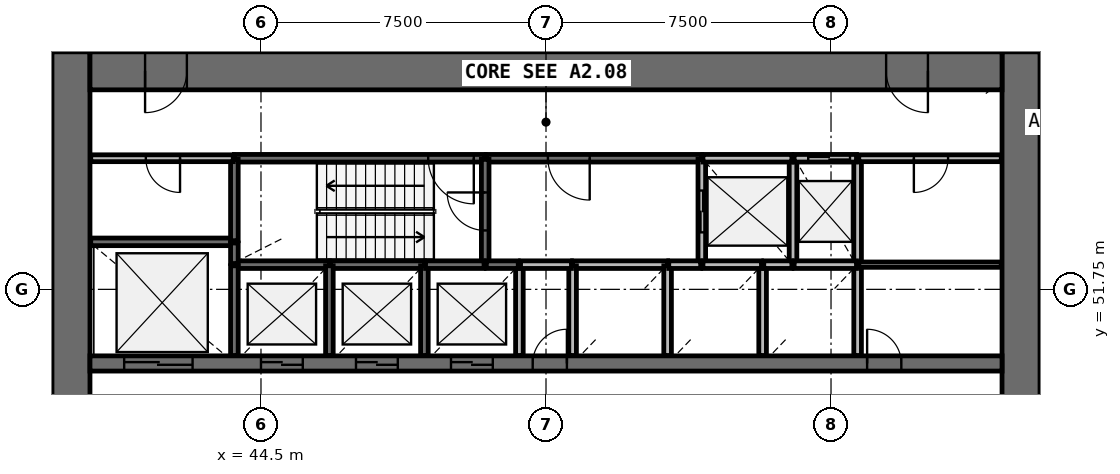
"""IFC4 building model, lengths in metres.
Left out: names, types, materials, properties, quantities, classifications, styles, units other than length and angle.
Written with IfcOpenShell. Run it as: python <this file> out.ifc"""

import sys

from ifc_helpers import new_model, si_unit, direction, frame, frame_2d, origin, place, context, subcontext, project, spatial, rectangle, extrude, source, transform, mapped, element, fill, save


model = new_model("IFC4")
c1 = context("Model", 3, precision=1e-05, world=origin(), true_north=direction((0.0, 1.0)))
c2 = subcontext(c1, "Body", "Model", "MODEL_VIEW")
j1 = project(units=[si_unit("LENGTHUNIT", "METRE"), si_unit("PLANEANGLEUNIT", "RADIAN")], contexts=[c1])
p1 = place(None, origin())
s1 = spatial("IfcSite", under=j1, at=p1, CompositionType="ELEMENT")
p2 = place(p1, origin())
s2 = spatial("IfcBuilding", under=s1, at=p2, CompositionType="ELEMENT")
p3 = place(p2, frame((0.0, 0.0, 31.4)))
s3 = spatial("IfcBuildingStorey", under=s2, at=p3, CompositionType="ELEMENT", Elevation=31.4)
p4 = place(p3, frame((64.5, 38.0, 0.0), z_axis=(0.0, 0.0, 1.0), x_axis=(0.0, 1.0, 0.0)))
e1 = element("IfcWall", 1, at=p4, inside=s3, PredefinedType="SHEAR", context=c2, shape_type="SweptSolid", body=[
    extrude(rectangle(XDim=20.0, YDim=1.0, at=frame_2d((10.0, 0.0))), origin(), (0.0, 0.0, 1.0), 4.4),
])
p5 = place(p4, frame((9.1, 0.0, 0.0)))
e2 = element("IfcOpeningElement", 2, at=p5, cuts=e1, PredefinedType="OPENING", context=c2, shape_type="SweptSolid", body=[
    extrude(rectangle(XDim=1.8, YDim=2.1, at=frame_2d((0.9, 1.05))), frame((0.0, 0.51, 0.0), z_axis=(0.0, -1.0, 0.0), x_axis=(1.0, 0.0, 0.0)), (0.0, 0.0, 1.0), 1.02),
])
p6 = place(p3, frame((39.5, 58.0, 0.0), z_axis=(0.0, 0.0, 1.0), x_axis=(0.0, -1.0, 0.0)))
e3 = element("IfcWall", 3, at=p6, inside=s3, PredefinedType="SHEAR", context=c2, shape_type="SweptSolid", body=[
    extrude(rectangle(XDim=20.0, YDim=1.0, at=frame_2d((10.0, 0.0))), origin(), (0.0, 0.0, 1.0), 4.4),
])
p7 = place(p6, frame((9.1, 0.0, 0.0)))
e4 = element("IfcOpeningElement", 4, at=p7, cuts=e3, PredefinedType="OPENING", context=c2, shape_type="SweptSolid", body=[
    extrude(rectangle(XDim=1.8, YDim=2.1, at=frame_2d((0.9, 1.05))), frame((0.0, 0.51, 0.0), z_axis=(0.0, -1.0, 0.0), x_axis=(1.0, 0.0, 0.0)), (0.0, 0.0, 1.0), 1.02),
])
p8 = place(p3, frame((64.0, 57.5, 0.0), z_axis=(0.0, 0.0, 1.0), x_axis=(-1.0, 0.0, 0.0)))
e5 = element("IfcWall", 5, at=p8, inside=s3, PredefinedType="SHEAR", context=c2, shape_type="SweptSolid", body=[
    extrude(rectangle(XDim=24.0, YDim=1.0, at=frame_2d((12.0, 0.0))), origin(), (0.0, 0.0, 1.0), 4.4),
])
p9 = place(p8, frame((21.45, 0.0, 0.0)))
e6 = element("IfcOpeningElement", 6, at=p9, cuts=e5, PredefinedType="OPENING", context=c2, shape_type="SweptSolid", body=[
    extrude(rectangle(XDim=1.1, YDim=2.1, at=frame_2d((0.55, 1.05))), frame((0.0, 0.51, 0.0), z_axis=(0.0, -1.0, 0.0), x_axis=(1.0, 0.0, 0.0)), (0.0, 0.0, 1.0), 1.02),
])
p10 = place(p8, frame((1.95, 0.0, 0.0)))
e7 = element("IfcOpeningElement", 7, at=p10, cuts=e5, PredefinedType="OPENING", context=c2, shape_type="SweptSolid", body=[
    extrude(rectangle(XDim=1.1, YDim=2.1, at=frame_2d((0.55, 1.05))), frame((0.0, 0.51, 0.0), z_axis=(0.0, -1.0, 0.0), x_axis=(1.0, 0.0, 0.0)), (0.0, 0.0, 1.0), 1.02),
])
p11 = place(p3, frame((40.0, 49.8, 0.0), z_axis=(0.0, 0.0, 1.0), x_axis=(1.0, 0.0, 0.0)))
e8 = element("IfcWall", 8, at=p11, inside=s3, PredefinedType="SHEAR", context=c2, shape_type="SweptSolid", body=[
    extrude(rectangle(XDim=24.0, YDim=0.4, at=frame_2d((12.0, 0.0))), origin(), (0.0, 0.0, 1.0), 4.4),
])
p12 = place(p11, frame((4.5, 0.0, 0.0)))
e9 = element("IfcOpeningElement", 9, at=p12, cuts=e8, PredefinedType="OPENING", context=c2, shape_type="SweptSolid", body=[
    extrude(rectangle(XDim=1.1, YDim=2.1, at=frame_2d((0.55, 1.05))), frame((0.0, 0.21, 0.0), z_axis=(0.0, -1.0, 0.0), x_axis=(1.0, 0.0, 0.0)), (0.0, 0.0, 1.0), 0.42),
])
p13 = place(p11, frame((7.0, 0.0, 0.0)))
e10 = element("IfcOpeningElement", 10, at=p13, cuts=e8, PredefinedType="OPENING", context=c2, shape_type="SweptSolid", body=[
    extrude(rectangle(XDim=1.1, YDim=2.1, at=frame_2d((0.55, 1.05))), frame((0.0, 0.21, 0.0), z_axis=(0.0, -1.0, 0.0), x_axis=(1.0, 0.0, 0.0)), (0.0, 0.0, 1.0), 0.42),
])
p14 = place(p11, frame((9.5, 0.0, 0.0)))
e11 = element("IfcOpeningElement", 11, at=p14, cuts=e8, PredefinedType="OPENING", context=c2, shape_type="SweptSolid", body=[
    extrude(rectangle(XDim=1.1, YDim=2.1, at=frame_2d((0.55, 1.05))), frame((0.0, 0.21, 0.0), z_axis=(0.0, -1.0, 0.0), x_axis=(1.0, 0.0, 0.0)), (0.0, 0.0, 1.0), 0.42),
])
p15 = place(p11, frame((0.9, 0.0, 0.0)))
e12 = element("IfcOpeningElement", 12, at=p15, cuts=e8, PredefinedType="OPENING", context=c2, shape_type="SweptSolid", body=[
    extrude(rectangle(XDim=1.8, YDim=2.4, at=frame_2d((0.9, 1.2))), frame((0.0, 0.21, 0.0), z_axis=(0.0, -1.0, 0.0), x_axis=(1.0, 0.0, 0.0)), (0.0, 0.0, 1.0), 0.42),
])
p16 = place(p11, frame((20.45, 0.0, 0.0)))
e13 = element("IfcOpeningElement", 13, at=p16, cuts=e8, PredefinedType="OPENING", context=c2, shape_type="SweptSolid", body=[
    extrude(rectangle(XDim=0.9, YDim=2.1, at=frame_2d((0.45, 1.05))), frame((0.0, 0.21, 0.0), z_axis=(0.0, -1.0, 0.0), x_axis=(1.0, 0.0, 0.0)), (0.0, 0.0, 1.0), 0.42),
])
p17 = place(p11, frame((11.65, 0.0, 0.0)))
e14 = element("IfcOpeningElement", 14, at=p17, cuts=e8, PredefinedType="OPENING", context=c2, shape_type="SweptSolid", body=[
    extrude(rectangle(XDim=0.9, YDim=2.1, at=frame_2d((0.45, 1.05))), frame((0.0, 0.21, 0.0), z_axis=(0.0, -1.0, 0.0), x_axis=(1.0, 0.0, 0.0)), (0.0, 0.0, 1.0), 0.42),
])
p18 = place(p3, frame((50.4, 55.2, 0.0), z_axis=(0.0, 0.0, 1.0), x_axis=(-1.0, 0.0, 0.0)))
e15 = element("IfcWall", 15, at=p18, inside=s3, PredefinedType="SOLIDWALL", context=c2, shape_type="SweptSolid", body=[
    extrude(rectangle(XDim=6.6, YDim=0.2, at=frame_2d((3.3, 0.0))), origin(), (0.0, 0.0, 1.0), 3.95),
])
p19 = place(p18, frame((0.3, 0.0, 0.0)))
e16 = element("IfcOpeningElement", 16, at=p19, cuts=e15, PredefinedType="OPENING", context=c2, shape_type="SweptSolid", body=[
    extrude(rectangle(XDim=1.2, YDim=2.1, at=frame_2d((0.6, 1.05))), frame((0.0, 0.11, 0.0), z_axis=(0.0, -1.0, 0.0), x_axis=(1.0, 0.0, 0.0)), (0.0, 0.0, 1.0), 0.22),
])
p20 = place(p3, frame((56.1, 55.2, 0.0), z_axis=(0.0, 0.0, 1.0), x_axis=(-1.0, 0.0, 0.0)))
e17 = element("IfcWall", 17, at=p20, inside=s3, PredefinedType="SOLIDWALL", context=c2, shape_type="SweptSolid", body=[
    extrude(rectangle(XDim=5.67, YDim=0.2, at=frame_2d((2.835, 0.0))), origin(), (0.0, 0.0, 1.0), 3.95),
])
p21 = place(p20, frame((2.95, 0.0, 0.0)))
e18 = element("IfcOpeningElement", 18, at=p21, cuts=e17, PredefinedType="OPENING", context=c2, shape_type="SweptSolid", body=[
    extrude(rectangle(XDim=1.1, YDim=2.1, at=frame_2d((0.55, 1.05))), frame((0.0, 0.11, 0.0), z_axis=(0.0, -1.0, 0.0), x_axis=(1.0, 0.0, 0.0)), (0.0, 0.0, 1.0), 0.22),
])
p22 = place(p3, frame((43.8, 53.0, 0.0), z_axis=(0.0, 0.0, 1.0), x_axis=(-1.0, 0.0, 0.0)))
e19 = element("IfcWall", 19, at=p22, inside=s3, PredefinedType="SOLIDWALL", context=c2, shape_type="SweptSolid", body=[
    extrude(rectangle(XDim=3.78, YDim=0.2, at=frame_2d((1.89, 0.0))), origin(), (0.0, 0.0, 1.0), 3.95),
])
p23 = place(p3, frame((50.4, 52.4, 0.0), z_axis=(0.0, 0.0, 1.0), x_axis=(0.0, 1.0, 0.0)))
e20 = element("IfcWall", 20, at=p23, inside=s3, PredefinedType="SOLIDWALL", context=c2, shape_type="SweptSolid", body=[
    extrude(rectangle(XDim=2.77, YDim=0.2, at=frame_2d((1.385, 0.0))), origin(), (0.0, 0.0, 1.0), 3.95),
])
p24 = place(p23, frame((0.9, 0.0, 0.0)))
e21 = element("IfcOpeningElement", 21, at=p24, cuts=e20, PredefinedType="OPENING", context=c2, shape_type="SweptSolid", body=[
    extrude(rectangle(XDim=1.0, YDim=2.1, at=frame_2d((0.5, 1.05))), frame((0.0, 0.11, 0.0), z_axis=(0.0, -1.0, 0.0), x_axis=(1.0, 0.0, 0.0)), (0.0, 0.0, 1.0), 0.22),
])
p25 = place(p3, frame((56.1, 55.17, 0.0), z_axis=(0.0, 0.0, 1.0), x_axis=(0.0, -1.0, 0.0)))
e22 = element("IfcWall", 22, at=p25, inside=s3, PredefinedType="SOLIDWALL", context=c2, shape_type="SweptSolid", body=[
    extrude(rectangle(XDim=2.77, YDim=0.2, at=frame_2d((1.385, 0.0))), origin(), (0.0, 0.0, 1.0), 3.95),
])
p26 = place(p25, frame((0.82, 0.0, 0.0)))
e23 = element("IfcOpeningElement", 23, at=p26, cuts=e22, PredefinedType="OPENING", context=c2, shape_type="SweptSolid", body=[
    extrude(rectangle(XDim=1.1, YDim=2.1, at=frame_2d((0.55, 1.05))), frame((0.0, 0.11, 0.0), z_axis=(0.0, -1.0, 0.0), x_axis=(1.0, 0.0, 0.0)), (0.0, 0.0, 1.0), 0.22),
])
for number, where, z_axis, x_axis in (
    (24, (58.5, 52.4, 0.0), (0.0, 0.0, 1.0), (0.0, 1.0, 0.0)),
    (25, (60.2, 52.4, 0.0), (0.0, 0.0, 1.0), (0.0, 1.0, 0.0)),
):
    element("IfcWall", number, at=place(p3, frame(where, z_axis=z_axis, x_axis=x_axis)), inside=s3, PredefinedType="SOLIDWALL", context=c2, shape_type="SweptSolid", body=[
        extrude(rectangle(XDim=2.8, YDim=0.2, at=frame_2d((1.4, 0.0))), origin(), (0.0, 0.0, 1.0), 3.95),
    ])
p27 = place(p3, frame((46.3, 52.4, 0.0), z_axis=(0.0, 0.0, 1.0), x_axis=(-1.0, 0.0, 0.0)))
e26 = element("IfcWall", 26, at=p27, inside=s3, PredefinedType="SOLIDWALL", context=c2, shape_type="SweptSolid", body=[
    extrude(rectangle(XDim=2.5, YDim=0.2, at=frame_2d((1.25, 0.0))), origin(), (0.0, 0.0, 1.0), 3.95),
])
p28 = place(p3, frame((48.8, 52.4, 0.0), z_axis=(0.0, 0.0, 1.0), x_axis=(-1.0, 0.0, 0.0)))
e27 = element("IfcWall", 27, at=p28, inside=s3, PredefinedType="SOLIDWALL", context=c2, shape_type="SweptSolid", body=[
    extrude(rectangle(XDim=2.47, YDim=0.2, at=frame_2d((1.235, 0.0))), origin(), (0.0, 0.0, 1.0), 3.95),
])
p29 = place(p3, frame((55.2, 52.4, 0.0), z_axis=(0.0, 0.0, 1.0), x_axis=(-1.0, 0.0, 0.0)))
e28 = element("IfcWall", 28, at=p29, inside=s3, PredefinedType="SOLIDWALL", context=c2, shape_type="SweptSolid", body=[
    extrude(rectangle(XDim=2.5, YDim=0.2, at=frame_2d((1.25, 0.0))), origin(), (0.0, 0.0, 1.0), 3.95),
])
p30 = place(p3, frame((58.47, 55.2, 0.0), z_axis=(0.0, 0.0, 1.0), x_axis=(-1.0, 0.0, 0.0)))
e29 = element("IfcWall", 29, at=p30, inside=s3, PredefinedType="SOLIDWALL", context=c2, shape_type="SweptSolid", body=[
    extrude(rectangle(XDim=2.34, YDim=0.2, at=frame_2d((1.17, 0.0))), origin(), (0.0, 0.0, 1.0), 3.95),
])
for number, where, z_axis, x_axis in (
    (30, (43.8, 52.37, 0.0), (0.0, 0.0, 1.0), (0.0, -1.0, 0.0)),
    (31, (46.3, 50.01, 0.0), (0.0, 0.0, 1.0), (0.0, 1.0, 0.0)),
    (32, (48.8, 50.01, 0.0), (0.0, 0.0, 1.0), (0.0, 1.0, 0.0)),
):
    element("IfcWall", number, at=place(p3, frame(where, z_axis=z_axis, x_axis=x_axis)), inside=s3, PredefinedType="SOLIDWALL", context=c2, shape_type="SweptSolid", body=[
        extrude(rectangle(XDim=2.36, YDim=0.2, at=frame_2d((1.18, 0.0))), origin(), (0.0, 0.0, 1.0), 3.95),
    ])
p31 = place(p3, frame((51.3, 50.01, 0.0), z_axis=(0.0, 0.0, 1.0), x_axis=(0.0, 1.0, 0.0)))
e33 = element("IfcWall", 33, at=p31, inside=s3, PredefinedType="SOLIDWALL", context=c2, shape_type="SweptSolid", body=[
    extrude(rectangle(XDim=2.39, YDim=0.2, at=frame_2d((1.195, 0.0))), origin(), (0.0, 0.0, 1.0), 3.95),
])
for number, where, z_axis, x_axis in (
    (34, (52.7, 52.37, 0.0), (0.0, 0.0, 1.0), (0.0, -1.0, 0.0)),
    (35, (55.2, 50.01, 0.0), (0.0, 0.0, 1.0), (0.0, 1.0, 0.0)),
):
    element("IfcWall", number, at=place(p3, frame(where, z_axis=z_axis, x_axis=x_axis)), inside=s3, PredefinedType="SOLIDWALL", context=c2, shape_type="SweptSolid", body=[
        extrude(rectangle(XDim=2.36, YDim=0.2, at=frame_2d((1.18, 0.0))), origin(), (0.0, 0.0, 1.0), 3.95),
    ])
p32 = place(p3, frame((57.7, 50.01, 0.0), z_axis=(0.0, 0.0, 1.0), x_axis=(0.0, 1.0, 0.0)))
e36 = element("IfcWall", 36, at=p32, inside=s3, PredefinedType="SOLIDWALL", context=c2, shape_type="SweptSolid", body=[
    extrude(rectangle(XDim=2.39, YDim=0.2, at=frame_2d((1.195, 0.0))), origin(), (0.0, 0.0, 1.0), 3.95),
])
p33 = place(p3, frame((60.2, 50.01, 0.0), z_axis=(0.0, 0.0, 1.0), x_axis=(0.0, 1.0, 0.0)))
e37 = element("IfcWall", 37, at=p33, inside=s3, PredefinedType="SOLIDWALL", context=c2, shape_type="SweptSolid", body=[
    extrude(rectangle(XDim=2.36, YDim=0.2, at=frame_2d((1.18, 0.0))), origin(), (0.0, 0.0, 1.0), 3.95),
])
p34 = place(p3, frame((43.8, 55.17, 0.0), z_axis=(0.0, 0.0, 1.0), x_axis=(0.0, -1.0, 0.0)))
e38 = element("IfcWall", 38, at=p34, inside=s3, PredefinedType="SOLIDWALL", context=c2, shape_type="SweptSolid", body=[
    extrude(rectangle(XDim=2.14, YDim=0.2, at=frame_2d((1.07, 0.0))), origin(), (0.0, 0.0, 1.0), 3.95),
])
p35 = place(p3, frame((60.17, 52.4, 0.0), z_axis=(0.0, 0.0, 1.0), x_axis=(-1.0, 0.0, 0.0)))
e39 = element("IfcWall", 39, at=p35, inside=s3, PredefinedType="SOLIDWALL", context=c2, shape_type="SweptSolid", body=[
    extrude(rectangle(XDim=1.64, YDim=0.2, at=frame_2d((0.82, 0.0))), origin(), (0.0, 0.0, 1.0), 3.95),
])
p36 = place(p3, frame((60.17, 55.2, 0.0), z_axis=(0.0, 0.0, 1.0), x_axis=(-1.0, 0.0, 0.0)))
e40 = element("IfcWall", 40, at=p36, inside=s3, PredefinedType="SOLIDWALL", context=c2, shape_type="SweptSolid", body=[
    extrude(rectangle(XDim=1.64, YDim=0.2, at=frame_2d((0.82, 0.0))), origin(), (0.0, 0.0, 1.0), 3.95),
])
p37 = place(p36, frame((0.17, 0.0, 0.0)))
e41 = element("IfcOpeningElement", 41, at=p37, cuts=e40, PredefinedType="OPENING", context=c2, shape_type="SweptSolid", body=[
    extrude(rectangle(XDim=1.1, YDim=2.1, at=frame_2d((0.55, 1.05))), frame((0.0, 0.11, 0.0), z_axis=(0.0, -1.0, 0.0), x_axis=(1.0, 0.0, 0.0)), (0.0, 0.0, 1.0), 0.22),
])
for number, where, z_axis, x_axis in (
    (42, (50.37, 52.4, 0.0), (0.0, 0.0, 1.0), (-1.0, 0.0, 0.0)),
    (43, (57.67, 52.4, 0.0), (0.0, 0.0, 1.0), (-1.0, 0.0, 0.0)),
):
    element("IfcWall", number, at=place(p3, frame(where, z_axis=z_axis, x_axis=x_axis)), inside=s3, PredefinedType="SOLIDWALL", context=c2, shape_type="SweptSolid", body=[
        extrude(rectangle(XDim=1.54, YDim=0.2, at=frame_2d((0.77, 0.0))), origin(), (0.0, 0.0, 1.0), 3.95),
    ])
p38 = place(p3, frame((51.33, 52.4, 0.0), z_axis=(0.0, 0.0, 1.0), x_axis=(1.0, 0.0, 0.0)))
e44 = element("IfcWall", 44, at=p38, inside=s3, PredefinedType="SOLIDWALL", context=c2, shape_type="SweptSolid", body=[
    extrude(rectangle(XDim=1.34, YDim=0.2, at=frame_2d((0.67, 0.0))), origin(), (0.0, 0.0, 1.0), 3.95),
])
for number, where, z_axis, x_axis in (
    (45, (51.27, 52.4, 0.0), (0.0, 0.0, 1.0), (-1.0, 0.0, 0.0)),
    (46, (56.07, 52.4, 0.0), (0.0, 0.0, 1.0), (-1.0, 0.0, 0.0)),
):
    element("IfcWall", number, at=place(p3, frame(where, z_axis=z_axis, x_axis=x_axis)), inside=s3, PredefinedType="SOLIDWALL", context=c2, shape_type="SweptSolid", body=[
        extrude(rectangle(XDim=0.84, YDim=0.2, at=frame_2d((0.42, 0.0))), origin(), (0.0, 0.0, 1.0), 3.95),
    ])
p39 = place(p3, frame((58.47, 52.4, 0.0), z_axis=(0.0, 0.0, 1.0), x_axis=(-1.0, 0.0, 0.0)))
e47 = element("IfcWall", 47, at=p39, inside=s3, PredefinedType="SOLIDWALL", context=c2, shape_type="SweptSolid", body=[
    extrude(rectangle(XDim=0.74, YDim=0.2, at=frame_2d((0.37, 0.0))), origin(), (0.0, 0.0, 1.0), 3.95),
])
p40 = place(p3, frame((43.8, 52.43, 0.0), z_axis=(0.0, 0.0, 1.0), x_axis=(0.0, 1.0, 0.0)))
e48 = element("IfcWall", 48, at=p40, inside=s3, PredefinedType="SOLIDWALL", context=c2, shape_type="SweptSolid", body=[
    extrude(rectangle(XDim=0.54, YDim=0.2, at=frame_2d((0.27, 0.0))), origin(), (0.0, 0.0, 1.0), 3.95),
])
p41 = place(p3, frame((43.77, 55.2, 0.0), z_axis=(0.0, 0.0, 1.0), x_axis=(-1.0, 0.0, 0.0)))
e49 = element("IfcWall", 49, at=p41, inside=s3, PredefinedType="PARTITIONING", context=c2, shape_type="SweptSolid", body=[
    extrude(rectangle(XDim=3.75, YDim=0.18, at=frame_2d((1.875, 0.0))), origin(), (0.0, 0.0, 1.0), 3.95),
])
p42 = place(p41, frame((1.4, 0.0, 0.0)))
e50 = element("IfcOpeningElement", 50, at=p42, cuts=e49, PredefinedType="OPENING", context=c2, shape_type="SweptSolid", body=[
    extrude(rectangle(XDim=0.9, YDim=2.1, at=frame_2d((0.45, 1.05))), frame((0.0, 0.1, 0.0), z_axis=(0.0, -1.0, 0.0), x_axis=(1.0, 0.0, 0.0)), (0.0, 0.0, 1.0), 0.2),
])
p43 = place(p3, frame((63.98, 55.2, 0.0), z_axis=(0.0, 0.0, 1.0), x_axis=(-1.0, 0.0, 0.0)))
e51 = element("IfcWall", 51, at=p43, inside=s3, PredefinedType="PARTITIONING", context=c2, shape_type="SweptSolid", body=[
    extrude(rectangle(XDim=3.75, YDim=0.18, at=frame_2d((1.875, 0.0))), origin(), (0.0, 0.0, 1.0), 3.95),
])
p44 = place(p43, frame((1.4, 0.0, 0.0)))
e52 = element("IfcOpeningElement", 52, at=p44, cuts=e51, PredefinedType="OPENING", context=c2, shape_type="SweptSolid", body=[
    extrude(rectangle(XDim=0.9, YDim=2.1, at=frame_2d((0.45, 1.05))), frame((0.0, 0.1, 0.0), z_axis=(0.0, -1.0, 0.0), x_axis=(1.0, 0.0, 0.0)), (0.0, 0.0, 1.0), 0.2),
])
p45 = place(p3, frame((63.98, 52.4, 0.0), z_axis=(0.0, 0.0, 1.0), x_axis=(-1.0, 0.0, 0.0)))
e53 = element("IfcWall", 53, at=p45, inside=s3, PredefinedType="PARTITIONING", context=c2, shape_type="SweptSolid", body=[
    extrude(rectangle(XDim=3.75, YDim=0.14, at=frame_2d((1.875, 0.0))), origin(), (0.0, 0.0, 1.0), 3.05),
])
m1 = source(origin(), c2, "Body", "SweptSolid", [
    extrude(rectangle(XDim=1.1, YDim=2.1, at=frame_2d((0.55, 1.05))), frame((0.0, 0.025, 0.0), z_axis=(0.0, -1.0, 0.0), x_axis=(1.0, 0.0, 0.0)), (0.0, 0.0, 1.0), 0.05),
])
p46 = place(p12, origin())
e54 = element("IfcDoor", 54, at=p46, inside=s3, OperationType="DOUBLE_DOOR_SLIDING", PredefinedType="USERDEFINED", context=c2, shape_type="MappedRepresentation", body=[
    mapped(m1, transform((0.0, 0.0, 0.0), scale=1.0)),
])
fill(e9, e54)
p47 = place(p13, origin())
e55 = element("IfcDoor", 55, at=p47, inside=s3, OperationType="DOUBLE_DOOR_SLIDING", PredefinedType="USERDEFINED", context=c2, shape_type="MappedRepresentation", body=[
    mapped(m1, transform((0.0, 0.0, 0.0), scale=1.0)),
])
fill(e10, e55)
p48 = place(p14, origin())
e56 = element("IfcDoor", 56, at=p48, inside=s3, OperationType="DOUBLE_DOOR_SLIDING", PredefinedType="USERDEFINED", context=c2, shape_type="MappedRepresentation", body=[
    mapped(m1, transform((0.0, 0.0, 0.0), scale=1.0)),
])
fill(e11, e56)
p49 = place(p26, origin())
e57 = element("IfcDoor", 57, at=p49, inside=s3, OperationType="DOUBLE_DOOR_SLIDING", PredefinedType="USERDEFINED", context=c2, shape_type="MappedRepresentation", body=[
    mapped(m1, transform((0.0, 0.0, 0.0), scale=1.0)),
])
fill(e23, e57)
p50 = place(p37, origin())
e58 = element("IfcDoor", 58, at=p50, inside=s3, OperationType="DOUBLE_DOOR_SLIDING", PredefinedType="USERDEFINED", context=c2, shape_type="MappedRepresentation", body=[
    mapped(m1, transform((0.0, 0.0, 0.0), scale=1.0)),
])
fill(e41, e58)
m2 = source(origin(), c2, "Body", "SweptSolid", [
    extrude(rectangle(XDim=1.8, YDim=2.4, at=frame_2d((0.9, 1.2))), frame((0.0, 0.025, 0.0), z_axis=(0.0, -1.0, 0.0), x_axis=(1.0, 0.0, 0.0)), (0.0, 0.0, 1.0), 0.05),
])
p51 = place(p15, origin())
e59 = element("IfcDoor", 59, at=p51, inside=s3, OperationType="DOUBLE_DOOR_SLIDING", PredefinedType="USERDEFINED", context=c2, shape_type="MappedRepresentation", body=[
    mapped(m2, transform((0.0, 0.0, 0.0), scale=1.0)),
])
fill(e12, e59)
m3 = source(origin(), c2, "Body", "SweptSolid", [
    extrude(rectangle(XDim=1.2, YDim=2.1, at=frame_2d((0.6, 1.05))), frame((0.0, 0.025, 0.0), z_axis=(0.0, -1.0, 0.0), x_axis=(1.0, 0.0, 0.0)), (0.0, 0.0, 1.0), 0.05),
])
p52 = place(p19, origin())
e60 = element("IfcDoor", 60, at=p52, inside=s3, OperationType="SINGLE_SWING_LEFT", PredefinedType="DOOR", context=c2, shape_type="MappedRepresentation", body=[
    mapped(m3, transform((0.0, 0.0, 0.0), scale=1.0)),
])
fill(e16, e60)
m4 = source(origin(), c2, "Body", "SweptSolid", [
    extrude(rectangle(XDim=1.0, YDim=2.1, at=frame_2d((0.5, 1.05))), frame((0.0, 0.025, 0.0), z_axis=(0.0, -1.0, 0.0), x_axis=(1.0, 0.0, 0.0)), (0.0, 0.0, 1.0), 0.05),
])
p53 = place(p24, origin())
e61 = element("IfcDoor", 61, at=p53, inside=s3, OperationType="SINGLE_SWING_RIGHT", PredefinedType="DOOR", context=c2, shape_type="MappedRepresentation", body=[
    mapped(m4, transform((0.0, 0.0, 0.0), scale=1.0)),
])
fill(e21, e61)
m5 = source(origin(), c2, "Body", "SweptSolid", [
    extrude(rectangle(XDim=1.1, YDim=2.1, at=frame_2d((0.55, 1.05))), frame((0.0, 0.025, 0.0), z_axis=(0.0, -1.0, 0.0), x_axis=(1.0, 0.0, 0.0)), (0.0, 0.0, 1.0), 0.05),
])
p54 = place(p21, origin())
e62 = element("IfcDoor", 62, at=p54, inside=s3, OperationType="SINGLE_SWING_LEFT", PredefinedType="DOOR", context=c2, shape_type="MappedRepresentation", body=[
    mapped(m5, transform((0.0, 0.0, 0.0), scale=1.0)),
])
fill(e18, e62)
m6 = source(origin(), c2, "Body", "SweptSolid", [
    extrude(rectangle(XDim=1.1, YDim=2.1, at=frame_2d((0.55, 1.05))), frame((0.0, 0.025, 0.0), z_axis=(0.0, -1.0, 0.0), x_axis=(1.0, 0.0, 0.0)), (0.0, 0.0, 1.0), 0.05),
])
p55 = place(p9, origin())
e63 = element("IfcDoor", 63, at=p55, inside=s3, OperationType="SINGLE_SWING_RIGHT", PredefinedType="DOOR", context=c2, shape_type="MappedRepresentation", body=[
    mapped(m6, transform((0.0, 0.0, 0.0), scale=1.0)),
])
fill(e6, e63)
p56 = place(p10, origin())
e64 = element("IfcDoor", 64, at=p56, inside=s3, OperationType="SINGLE_SWING_LEFT", PredefinedType="DOOR", context=c2, shape_type="MappedRepresentation", body=[
    mapped(m6, transform((0.0, 0.0, 0.0), scale=1.0)),
])
fill(e7, e64)
m7 = source(origin(), c2, "Body", "SweptSolid", [
    extrude(rectangle(XDim=0.9, YDim=2.1, at=frame_2d((0.45, 1.05))), frame((0.0, 0.025, 0.0), z_axis=(0.0, -1.0, 0.0), x_axis=(1.0, 0.0, 0.0)), (0.0, 0.0, 1.0), 0.05),
])
p57 = place(p42, origin())
e65 = element("IfcDoor", 65, at=p57, inside=s3, OperationType="SINGLE_SWING_LEFT", PredefinedType="DOOR", context=c2, shape_type="MappedRepresentation", body=[
    mapped(m7, transform((0.0, 0.0, 0.0), scale=1.0)),
])
fill(e50, e65)
p58 = place(p16, origin())
e66 = element("IfcDoor", 66, at=p58, inside=s3, OperationType="SINGLE_SWING_LEFT", PredefinedType="DOOR", context=c2, shape_type="MappedRepresentation", body=[
    mapped(m7, transform((0.0, 0.0, 0.0), scale=1.0)),
])
fill(e13, e66)
p59 = place(p44, origin())
e67 = element("IfcDoor", 67, at=p59, inside=s3, OperationType="SINGLE_SWING_RIGHT", PredefinedType="DOOR", context=c2, shape_type="MappedRepresentation", body=[
    mapped(m7, transform((0.0, 0.0, 0.0), scale=1.0)),
])
fill(e52, e67)
p60 = place(p17, origin())
e68 = element("IfcDoor", 68, at=p60, inside=s3, OperationType="SINGLE_SWING_RIGHT", PredefinedType="DOOR", context=c2, shape_type="MappedRepresentation", body=[
    mapped(m7, transform((0.0, 0.0, 0.0), scale=1.0)),
])
fill(e14, e68)
save(model, sys.argv[1])
